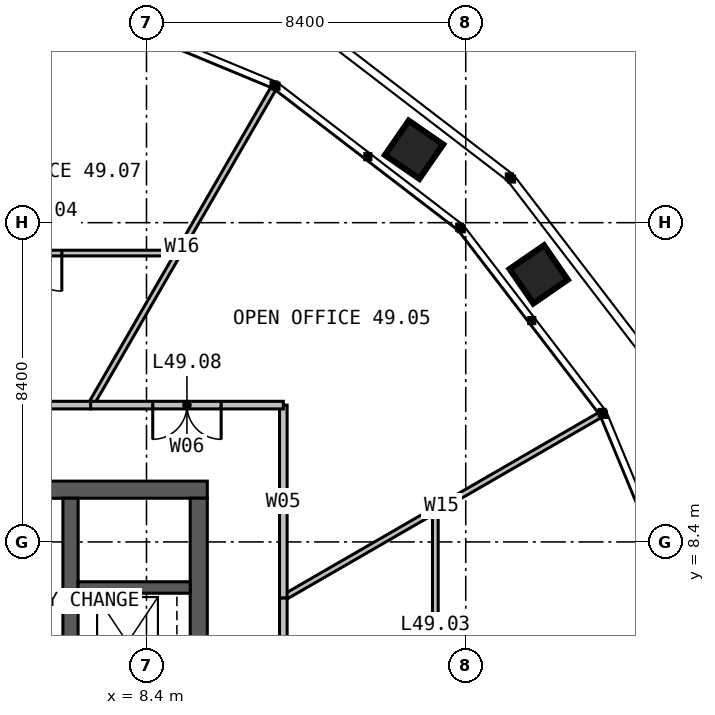
"""IFC4 building model, lengths in metres.
Left out: names, types, materials, properties, quantities, classifications, styles, units other than length and angle.
Written with IfcOpenShell. Run it as: python <this file> out.ifc"""

import sys

from ifc_helpers import new_model, si_unit, direction, frame, frame_2d, origin, place, context, subcontext, project, spatial, rectangle, extrude, element, fill, save


model = new_model("IFC4")
c1 = context("Model", 3, precision=1e-05, world=origin(), true_north=direction((0.0, 1.0)))
c2 = subcontext(c1, "Body", "Model", "MODEL_VIEW")
j1 = project(units=[si_unit("LENGTHUNIT", "METRE"), si_unit("PLANEANGLEUNIT", "RADIAN")], contexts=[c1])
p1 = place(None, origin())
s1 = spatial("IfcSite", under=j1, at=p1, CompositionType="ELEMENT")
p2 = place(p1, origin())
s2 = spatial("IfcBuilding", under=s1, at=p2, CompositionType="ELEMENT")
p3 = place(p2, frame((0.0, 0.0, 203.0)))
s3 = spatial("IfcBuildingStorey", under=s2, at=p3, CompositionType="ELEMENT", Elevation=203.0)
p4 = place(p3, frame((-10.0, 9.775, 0.0), z_axis=(0.0, 0.0, 1.0), x_axis=(1.0, 0.0, 0.0)))
e1 = element("IfcWall", 1, at=p4, inside=s3, PredefinedType="SOLIDWALL", context=c2, shape_type="SweptSolid", body=[
    extrude(rectangle(XDim=20.0, YDim=0.45, at=frame_2d((10.0, 0.0))), origin(), (0.0, 0.0, 1.0), 4.0),
])
p5 = place(p4, frame((9.4, 0.0, 0.0)))
e2 = element("IfcOpeningElement", 2, at=p5, cuts=e1, PredefinedType="OPENING", context=c2, shape_type="SweptSolid", body=[
    extrude(rectangle(XDim=1.2, YDim=2.2, at=frame_2d((0.6, 1.1))), frame((0.0, 0.235, 0.0), z_axis=(0.0, -1.0, 0.0), x_axis=(1.0, 0.0, 0.0)), (0.0, 0.0, 1.0), 0.47),
])
p6 = place(p3, frame((9.775, -9.55, 0.0), z_axis=(0.0, 0.0, 1.0), x_axis=(0.0, 1.0, 0.0)))
e3 = element("IfcWall", 3, at=p6, inside=s3, PredefinedType="SOLIDWALL", context=c2, shape_type="SweptSolid", body=[
    extrude(rectangle(XDim=19.1, YDim=0.45, at=frame_2d((9.55, 0.0))), origin(), (0.0, 0.0, 1.0), 4.0),
])
p7 = place(p3, frame((6.4, 9.55, 0.0), z_axis=(0.0, 0.0, 1.0), x_axis=(0.0, -1.0, 0.0)))
e4 = element("IfcWall", 4, at=p7, inside=s3, PredefinedType="SOLIDWALL", context=c2, shape_type="SweptSolid", body=[
    extrude(rectangle(XDim=19.1, YDim=0.4, at=frame_2d((9.55, 0.0))), origin(), (0.0, 0.0, 1.0), 4.0),
])
p8 = place(p7, frame((9.05, 0.0, 0.0)))
e5 = element("IfcOpeningElement", 5, at=p8, cuts=e4, PredefinedType="OPENING", context=c2, shape_type="SweptSolid", body=[
    extrude(rectangle(XDim=1.0, YDim=2.2, at=frame_2d((0.5, 1.1))), frame((0.0, 0.21, 0.0), z_axis=(0.0, -1.0, 0.0), x_axis=(1.0, 0.0, 0.0)), (0.0, 0.0, 1.0), 0.42),
])
p9 = place(p3, frame((6.6, 7.2, 0.0), z_axis=(0.0, 0.0, 1.0), x_axis=(1.0, 0.0, 0.0)))
e6 = element("IfcWall", 6, at=p9, inside=s3, PredefinedType="SOLIDWALL", context=c2, shape_type="SweptSolid", body=[
    extrude(rectangle(XDim=2.95, YDim=0.3, at=frame_2d((1.475, 0.0))), origin(), (0.0, 0.0, 1.0), 4.0),
])
p10 = place(p3, frame((1.35, 6.8, 0.0), z_axis=(0.0, 0.0, 1.0), x_axis=(1.0, 0.0, 0.0)))
e7 = element("IfcWall", 7, at=p10, inside=s3, PredefinedType="PARTITIONING", context=c2, shape_type="SweptSolid", body=[
    extrude(rectangle(XDim=4.85, YDim=0.15, at=frame_2d((2.425, 0.0))), origin(), (0.0, 0.0, 1.0), 3.75),
])
for number, where, z_axis, x_axis in (
    (8, (12.0, 6.928, 0.0), (0.0, 0.0, 1.0), (0.866, 0.5, 0.0)),
    (9, (6.928, 12.0, 0.0), (0.0, 0.0, 1.0), (0.5, 0.866, 0.0)),
):
    element("IfcWall", number, at=place(p3, frame(where, z_axis=z_axis, x_axis=x_axis)), inside=s3, PredefinedType="PARTITIONING", context=c2, shape_type="SweptSolid", body=[
        extrude(rectangle(XDim=9.62, YDim=0.15, at=frame_2d((4.81, 0.0))), origin(), (0.0, 0.0, 1.0), 2.79),
    ])
p11 = place(p3, frame((16.0, -9.238, 0.0), z_axis=(0.0, 0.0, 1.0), x_axis=(0.0, 1.0, 0.0)))
e10 = element("IfcWall", 10, at=p11, inside=s3, PredefinedType="PARTITIONING", context=c2, shape_type="SweptSolid", body=[
    extrude(rectangle(XDim=18.475, YDim=0.15, at=frame_2d((9.238, 0.0))), origin(), (0.0, 0.0, 1.0), 2.79),
])
p12 = place(p11, frame((1.975, 0.0, 0.0)))
e11 = element("IfcOpeningElement", 11, at=p12, cuts=e10, PredefinedType="OPENING", context=c2, shape_type="SweptSolid", body=[
    extrude(rectangle(XDim=1.0, YDim=2.2, at=frame_2d((0.5, 1.1))), frame((0.0, 0.085, 0.0), z_axis=(0.0, -1.0, 0.0), x_axis=(1.0, 0.0, 0.0)), (0.0, 0.0, 1.0), 0.17),
])
p13 = place(p11, frame((6.594, 0.0, 0.0)))
e12 = element("IfcOpeningElement", 12, at=p13, cuts=e10, PredefinedType="OPENING", context=c2, shape_type="SweptSolid", body=[
    extrude(rectangle(XDim=1.0, YDim=2.2, at=frame_2d((0.5, 1.1))), frame((0.0, 0.085, 0.0), z_axis=(0.0, -1.0, 0.0), x_axis=(1.0, 0.0, 0.0)), (0.0, 0.0, 1.0), 0.17),
])
p14 = place(p11, frame((12.956, 0.0, 0.0)))
e13 = element("IfcOpeningElement", 13, at=p14, cuts=e10, PredefinedType="OPENING", context=c2, shape_type="SweptSolid", body=[
    extrude(rectangle(XDim=1.8, YDim=2.2, at=frame_2d((0.9, 1.1))), frame((0.0, 0.085, 0.0), z_axis=(0.0, -1.0, 0.0), x_axis=(1.0, 0.0, 0.0)), (0.0, 0.0, 1.0), 0.17),
])
p15 = place(p3, frame((12.0, -6.928, 0.0), z_axis=(0.0, 0.0, 1.0), x_axis=(0.0, 1.0, 0.0)))
e14 = element("IfcWall", 14, at=p15, inside=s3, PredefinedType="PARTITIONING", context=c2, shape_type="SweptSolid", body=[
    extrude(rectangle(XDim=13.856, YDim=0.2, at=frame_2d((6.928, 0.0))), origin(), (0.0, 0.0, 1.0), 3.8),
])
p16 = place(p15, frame((6.028, 0.0, 0.0)))
e15 = element("IfcOpeningElement", 15, at=p16, cuts=e14, PredefinedType="OPENING", context=c2, shape_type="SweptSolid", body=[
    extrude(rectangle(XDim=1.8, YDim=2.2, at=frame_2d((0.9, 1.1))), frame((0.0, 0.11, 0.0), z_axis=(0.0, -1.0, 0.0), x_axis=(1.0, 0.0, 0.0)), (0.0, 0.0, 1.0), 0.22),
])
p17 = place(p3, frame((12.0, 6.928, 0.0), z_axis=(0.0, 0.0, 1.0), x_axis=(0.0, 1.0, 0.0)))
e16 = element("IfcWall", 16, at=p17, inside=s3, PredefinedType="PARTITIONING", context=c2, shape_type="SweptSolid", body=[
    extrude(rectangle(XDim=5.072, YDim=0.2, at=frame_2d((2.536, 0.0))), origin(), (0.0, 0.0, 1.0), 3.8),
])
p18 = place(p3, frame((12.0, 12.0, 0.0), z_axis=(0.0, 0.0, 1.0), x_axis=(-1.0, 0.0, 0.0)))
e17 = element("IfcWall", 17, at=p18, inside=s3, PredefinedType="PARTITIONING", context=c2, shape_type="SweptSolid", body=[
    extrude(rectangle(XDim=5.072, YDim=0.2, at=frame_2d((2.536, 0.0))), origin(), (0.0, 0.0, 1.0), 3.8),
])
p19 = place(p18, frame((1.636, 0.0, 0.0)))
e18 = element("IfcOpeningElement", 18, at=p19, cuts=e17, PredefinedType="OPENING", context=c2, shape_type="SweptSolid", body=[
    extrude(rectangle(XDim=1.8, YDim=2.2, at=frame_2d((0.9, 1.1))), frame((0.0, 0.11, 0.0), z_axis=(0.0, -1.0, 0.0), x_axis=(1.0, 0.0, 0.0)), (0.0, 0.0, 1.0), 0.22),
])
p20 = place(p3, frame((9.238, 16.0, 0.0), z_axis=(0.0, 0.0, 1.0), x_axis=(-1.0, 0.0, 0.0)))
e19 = element("IfcWall", 19, at=p20, inside=s3, PredefinedType="PARTITIONING", context=c2, shape_type="SweptSolid", body=[
    extrude(rectangle(XDim=18.475, YDim=0.15, at=frame_2d((9.238, 0.0))), origin(), (0.0, 0.0, 1.0), 2.79),
])
p21 = place(p20, frame((3.066, 0.0, 0.0)))
e20 = element("IfcOpeningElement", 20, at=p21, cuts=e19, PredefinedType="OPENING", context=c2, shape_type="SweptSolid", body=[
    extrude(rectangle(XDim=1.0, YDim=2.2, at=frame_2d((0.5, 1.1))), frame((0.0, 0.085, 0.0), z_axis=(0.0, -1.0, 0.0), x_axis=(1.0, 0.0, 0.0)), (0.0, 0.0, 1.0), 0.17),
])
p22 = place(p20, frame((10.598, 0.0, 0.0)))
e21 = element("IfcOpeningElement", 21, at=p22, cuts=e19, PredefinedType="OPENING", context=c2, shape_type="SweptSolid", body=[
    extrude(rectangle(XDim=1.8, YDim=2.2, at=frame_2d((0.9, 1.1))), frame((0.0, 0.085, 0.0), z_axis=(0.0, -1.0, 0.0), x_axis=(1.0, 0.0, 0.0)), (0.0, 0.0, 1.0), 0.17),
])
p23 = place(p20, frame((16.67, 0.0, 0.0)))
e22 = element("IfcOpeningElement", 22, at=p23, cuts=e19, PredefinedType="OPENING", context=c2, shape_type="SweptSolid", body=[
    extrude(rectangle(XDim=1.0, YDim=2.2, at=frame_2d((0.5, 1.1))), frame((0.0, 0.085, 0.0), z_axis=(0.0, -1.0, 0.0), x_axis=(1.0, 0.0, 0.0)), (0.0, 0.0, 1.0), 0.17),
])
p24 = place(p3, frame((6.928, 12.0, 0.0), z_axis=(0.0, 0.0, 1.0), x_axis=(-1.0, 0.0, 0.0)))
e23 = element("IfcWall", 23, at=p24, inside=s3, PredefinedType="PARTITIONING", context=c2, shape_type="SweptSolid", body=[
    extrude(rectangle(XDim=13.856, YDim=0.2, at=frame_2d((6.928, 0.0))), origin(), (0.0, 0.0, 1.0), 3.8),
])
p25 = place(p24, frame((6.028, 0.0, 0.0)))
e24 = element("IfcOpeningElement", 24, at=p25, cuts=e23, PredefinedType="OPENING", context=c2, shape_type="SweptSolid", body=[
    extrude(rectangle(XDim=1.8, YDim=2.2, at=frame_2d((0.9, 1.1))), frame((0.0, 0.11, 0.0), z_axis=(0.0, -1.0, 0.0), x_axis=(1.0, 0.0, 0.0)), (0.0, 0.0, 1.0), 0.22),
])
p26 = place(p19, origin())
e25 = element("IfcDoor", 25, at=p26, inside=s3, OperationType="DOUBLE_DOOR_SINGLE_SWING", PredefinedType="DOOR", context=c2, shape_type="SweptSolid", body=[
    extrude(rectangle(XDim=1.8, YDim=2.2, at=frame_2d((0.9, 1.1))), frame((0.0, 0.025, 0.0), z_axis=(0.0, -1.0, 0.0), x_axis=(1.0, 0.0, 0.0)), (0.0, 0.0, 1.0), 0.05),
])
fill(e18, e25)
p27 = place(p21, origin())
e26 = element("IfcDoor", 26, at=p27, inside=s3, OperationType="SINGLE_SWING_LEFT", PredefinedType="DOOR", context=c2, shape_type="SweptSolid", body=[
    extrude(rectangle(XDim=1.0, YDim=2.2, at=frame_2d((0.5, 1.1))), frame((0.0, 0.025, 0.0), z_axis=(0.0, -1.0, 0.0), x_axis=(1.0, 0.0, 0.0)), (0.0, 0.0, 1.0), 0.05),
])
fill(e20, e26)
save(model, sys.argv[1])
